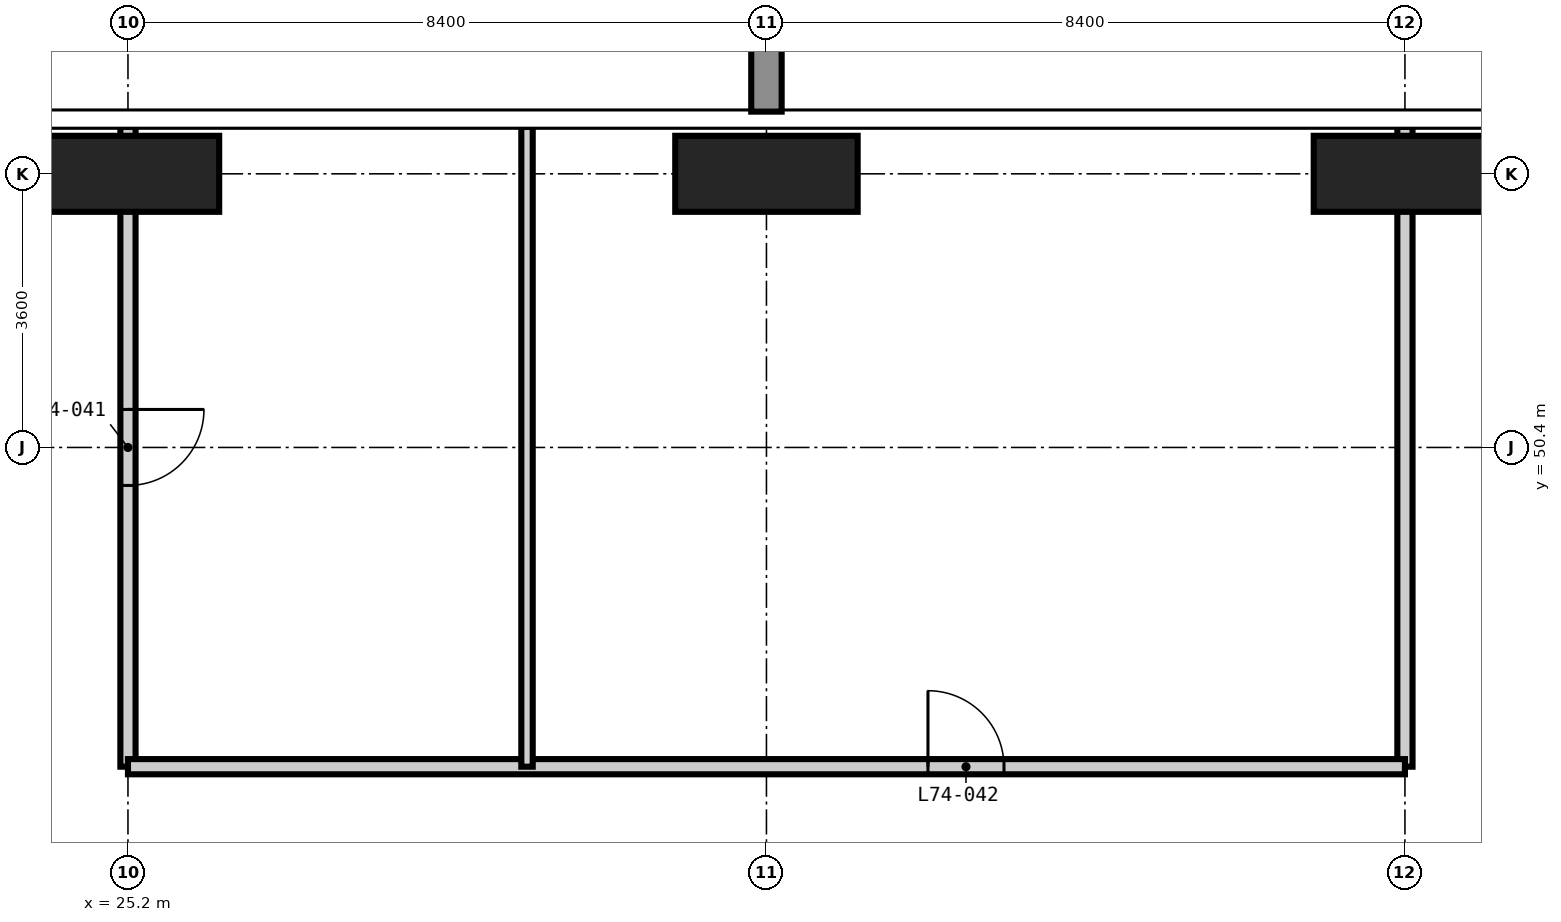
"""IFC4 building model, lengths in metres.
Left out: names, types, materials, properties, quantities, classifications, styles, units other than length and angle.
Written with IfcOpenShell. Run it as: python <this file> out.ifc"""

import sys

from ifc_helpers import new_model, si_unit, direction, frame, frame_2d, origin, origin_2d, place, context, subcontext, project, spatial, rectangle, extrude, element, fill, save


model = new_model("IFC4")
c1 = context("Model", 3, precision=1e-05, world=origin(), true_north=direction((0.0, 1.0)))
c2 = subcontext(c1, "Body", "Model", "MODEL_VIEW")
j1 = project(units=[si_unit("LENGTHUNIT", "METRE"), si_unit("PLANEANGLEUNIT", "RADIAN")], contexts=[c1])
p1 = place(None, origin())
s1 = spatial("IfcSite", under=j1, at=p1, CompositionType="ELEMENT")
p2 = place(p1, origin())
s2 = spatial("IfcBuilding", under=s1, at=p2, CompositionType="ELEMENT")
p3 = place(p2, frame((0.0, 0.0, 289.1)))
s3 = spatial("IfcBuildingStorey", under=s2, at=p3, CompositionType="ELEMENT", Elevation=289.1)
for number, where, z_axis, x_axis in (
    (1, (25.2, 54.0, -0.35), (0.0, 0.0, 1.0), (1.0, 0.0, 0.0)),
    (2, (33.6, 54.0, -0.35), (0.0, 0.0, 1.0), (1.0, 0.0, 0.0)),
    (3, (42.0, 54.0, -0.35), (0.0, 0.0, 1.0), (1.0, 0.0, 0.0)),
):
    element("IfcColumn", number, at=place(p3, frame(where, z_axis=z_axis, x_axis=x_axis)), inside=s3, PredefinedType="COLUMN", context=c2, shape_type="SweptSolid", body=[
        extrude(rectangle(XDim=2.4, YDim=1.0, at=origin_2d()), origin(), (0.0, 0.0, 1.0), 4.5),
    ])
p4 = place(p3, frame((25.2, 46.2, 0.0), z_axis=(0.0, 0.0, 1.0), x_axis=(0.0, 1.0, 0.0)))
e4 = element("IfcWall", 4, at=p4, inside=s3, PredefinedType="PARTITIONING", context=c2, shape_type="SweptSolid", body=[
    extrude(rectangle(XDim=8.418, YDim=0.2, at=frame_2d((4.209, 0.0))), origin(), (0.0, 0.0, 1.0), 4.15),
])
p5 = place(p4, frame((3.7, 0.0, 0.0)))
e5 = element("IfcOpeningElement", 5, at=p5, cuts=e4, PredefinedType="OPENING", context=c2, shape_type="SweptSolid", body=[
    extrude(rectangle(XDim=1.0, YDim=2.1, at=frame_2d((0.5, 1.05))), frame((0.0, 0.11, 0.0), z_axis=(0.0, -1.0, 0.0), x_axis=(1.0, 0.0, 0.0)), (0.0, 0.0, 1.0), 0.22),
])
p6 = place(p3, frame((42.0, 46.2, 0.0), z_axis=(0.0, 0.0, 1.0), x_axis=(0.0, 1.0, 0.0)))
e6 = element("IfcWall", 6, at=p6, inside=s3, PredefinedType="PARTITIONING", context=c2, shape_type="SweptSolid", body=[
    extrude(rectangle(XDim=8.418, YDim=0.2, at=frame_2d((4.209, 0.0))), origin(), (0.0, 0.0, 1.0), 4.15),
])
p7 = place(p3, frame((25.2, 46.2, 0.0), z_axis=(0.0, 0.0, 1.0), x_axis=(1.0, 0.0, 0.0)))
e7 = element("IfcWall", 7, at=p7, inside=s3, PredefinedType="PARTITIONING", context=c2, shape_type="SweptSolid", body=[
    extrude(rectangle(XDim=16.8, YDim=0.2, at=frame_2d((8.4, 0.0))), origin(), (0.0, 0.0, 1.0), 4.15),
])
p8 = place(p7, frame((10.525, 0.0, 0.0)))
e8 = element("IfcOpeningElement", 8, at=p8, cuts=e7, PredefinedType="OPENING", context=c2, shape_type="SweptSolid", body=[
    extrude(rectangle(XDim=1.0, YDim=2.1, at=frame_2d((0.5, 1.05))), frame((0.0, 0.11, 0.0), z_axis=(0.0, -1.0, 0.0), x_axis=(1.0, 0.0, 0.0)), (0.0, 0.0, 1.0), 0.22),
])
p9 = place(p3, frame((30.45, 46.2, 0.0), z_axis=(0.0, 0.0, 1.0), x_axis=(0.0, 1.0, 0.0)))
e9 = element("IfcWall", 9, at=p9, inside=s3, PredefinedType="PARTITIONING", context=c2, shape_type="SweptSolid", body=[
    extrude(rectangle(XDim=8.418, YDim=0.15, at=frame_2d((4.209, 0.0))), origin(), (0.0, 0.0, 1.0), 4.15),
])
p10 = place(p5, frame((1.0, 0.0, 0.0), z_axis=(0.0, 0.0, 1.0), x_axis=(-1.0, 0.0, 0.0)))
e10 = element("IfcDoor", 10, at=p10, inside=s3, OperationType="SINGLE_SWING_LEFT", PredefinedType="DOOR", context=c2, shape_type="SweptSolid", body=[
    extrude(rectangle(XDim=1.0, YDim=2.1, at=frame_2d((0.5, 1.05))), frame((0.0, 0.025, 0.0), z_axis=(0.0, -1.0, 0.0), x_axis=(1.0, 0.0, 0.0)), (0.0, 0.0, 1.0), 0.05),
])
fill(e5, e10)
p11 = place(p8, origin())
e11 = element("IfcDoor", 11, at=p11, inside=s3, OperationType="SINGLE_SWING_LEFT", PredefinedType="DOOR", context=c2, shape_type="SweptSolid", body=[
    extrude(rectangle(XDim=1.0, YDim=2.1, at=frame_2d((0.5, 1.05))), frame((0.0, 0.025, 0.0), z_axis=(0.0, -1.0, 0.0), x_axis=(1.0, 0.0, 0.0)), (0.0, 0.0, 1.0), 0.05),
])
fill(e8, e11)
save(model, sys.argv[1])
